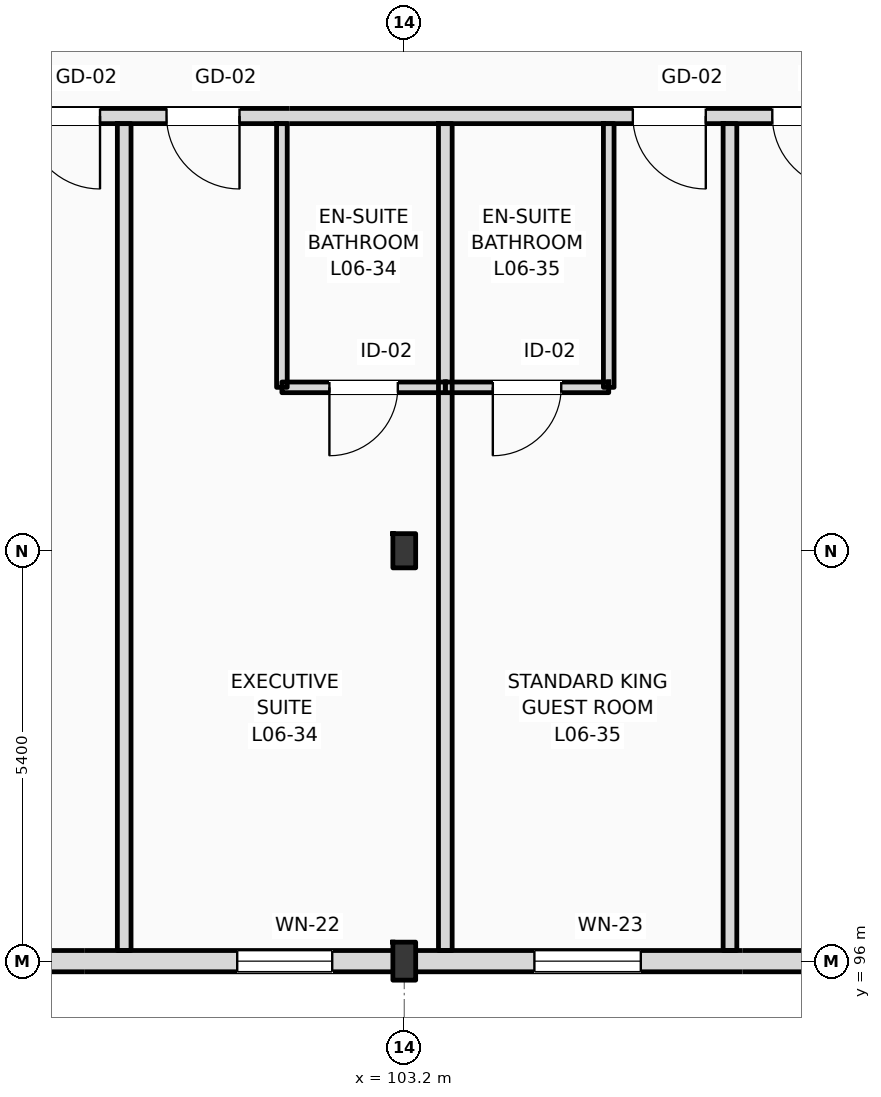
"""IFC4 building model, lengths in metres.
Left out: names, types, materials, properties, quantities, classifications, styles, units other than length and angle.
Written with IfcOpenShell. Run it as: python <this file> out.ifc"""

import sys

from ifc_helpers import new_model, si_unit, direction, frame, frame_2d, origin, origin_2d, place, context, subcontext, project, spatial, rectangle, i_section, extrude, element, fill, save


model = new_model("IFC4")
c1 = context("Model", 3, precision=1e-05, world=origin(), true_north=direction((0.0, 1.0)))
c2 = subcontext(c1, "Body", "Model", "MODEL_VIEW")
j1 = project(units=[si_unit("LENGTHUNIT", "METRE"), si_unit("PLANEANGLEUNIT", "RADIAN")], contexts=[c1])
p1 = place(None, origin())
s1 = spatial("IfcSite", under=j1, at=p1, CompositionType="ELEMENT")
p2 = place(p1, origin())
s2 = spatial("IfcBuilding", under=s1, at=p2, CompositionType="ELEMENT")
p3 = place(p2, frame((0.0, 0.0, 28.2)))
s3 = spatial("IfcBuildingStorey", under=s2, at=p3, CompositionType="ELEMENT", Elevation=28.2)
p4 = place(p3, frame((103.2, 96.0, 0.0), z_axis=(0.0, 0.0, 1.0), x_axis=(1.0, 0.0, 0.0)))
e1 = element("IfcColumn", 1, at=p4, inside=s3, PredefinedType="COLUMN", context=c2, shape_type="SweptSolid", body=[
    extrude(i_section(OverallWidth=0.3, OverallDepth=0.5, WebThickness=0.014, FlangeThickness=0.028, FilletRadius=0.027, at=origin_2d()), origin(), (0.0, 0.0, 1.0), 3.6),
])
p5 = place(p3, frame((103.2, 101.4, 0.0), z_axis=(0.0, 0.0, 1.0), x_axis=(1.0, 0.0, 0.0)))
e2 = element("IfcColumn", 2, at=p5, inside=s3, PredefinedType="COLUMN", context=c2, shape_type="SweptSolid", body=[
    extrude(i_section(OverallWidth=0.3, OverallDepth=0.45, WebThickness=0.014, FlangeThickness=0.026, FilletRadius=0.027, at=origin_2d()), origin(), (0.0, 0.0, 1.0), 3.6),
])
p6 = place(p3, frame((25.2, 96.0, 0.0), z_axis=(0.0, 0.0, 1.0), x_axis=(1.0, 0.0, 0.0)))
e3 = element("IfcWall", 3, at=p6, inside=s3, PredefinedType="STANDARD", context=c2, shape_type="SweptSolid", body=[
    extrude(rectangle(XDim=94.8, YDim=0.28, at=frame_2d((47.4, 0.0))), origin(), (0.0, 0.0, 1.0), 2.8),
])
p7 = place(p6, frame((16.454, 0.0, 0.9)))
e4 = element("IfcOpeningElement", 4, at=p7, cuts=e3, PredefinedType="OPENING", context=c2, shape_type="SweptSolid", body=[
    extrude(rectangle(XDim=2.7, YDim=1.72, at=frame_2d((1.35, 0.86))), frame((0.0, 0.15, 0.0), z_axis=(0.0, -1.0, 0.0), x_axis=(1.0, 0.0, 0.0)), (0.0, 0.0, 1.0), 0.3),
])
p8 = place(p6, frame((20.068, 0.0, 0.9)))
e5 = element("IfcOpeningElement", 5, at=p8, cuts=e3, PredefinedType="OPENING", context=c2, shape_type="SweptSolid", body=[
    extrude(rectangle(XDim=2.389, YDim=1.72, at=frame_2d((1.194, 0.86))), frame((0.0, 0.15, 0.0), z_axis=(0.0, -1.0, 0.0), x_axis=(1.0, 0.0, 0.0)), (0.0, 0.0, 1.0), 0.3),
])
p9 = place(p6, frame((24.277, 0.0, 0.9)))
e6 = element("IfcOpeningElement", 6, at=p9, cuts=e3, PredefinedType="OPENING", context=c2, shape_type="SweptSolid", body=[
    extrude(rectangle(XDim=1.8, YDim=1.72, at=frame_2d((0.9, 0.86))), frame((0.0, 0.15, 0.0), z_axis=(0.0, -1.0, 0.0), x_axis=(1.0, 0.0, 0.0)), (0.0, 0.0, 1.0), 0.3),
])
p10 = place(p6, frame((27.885, 0.0, 0.9)))
e7 = element("IfcOpeningElement", 7, at=p10, cuts=e3, PredefinedType="OPENING", context=c2, shape_type="SweptSolid", body=[
    extrude(rectangle(XDim=2.388, YDim=1.72, at=frame_2d((1.194, 0.86))), frame((0.0, 0.15, 0.0), z_axis=(0.0, -1.0, 0.0), x_axis=(1.0, 0.0, 0.0)), (0.0, 0.0, 1.0), 0.3),
])
p11 = place(p6, frame((32.093, 0.0, 0.9)))
e8 = element("IfcOpeningElement", 8, at=p11, cuts=e3, PredefinedType="OPENING", context=c2, shape_type="SweptSolid", body=[
    extrude(rectangle(XDim=1.8, YDim=1.72, at=frame_2d((0.9, 0.86))), frame((0.0, 0.15, 0.0), z_axis=(0.0, -1.0, 0.0), x_axis=(1.0, 0.0, 0.0)), (0.0, 0.0, 1.0), 0.3),
])
p12 = place(p6, frame((35.702, 0.0, 0.9)))
e9 = element("IfcOpeningElement", 9, at=p12, cuts=e3, PredefinedType="OPENING", context=c2, shape_type="SweptSolid", body=[
    extrude(rectangle(XDim=2.488, YDim=1.72, at=frame_2d((1.244, 0.86))), frame((0.0, 0.15, 0.0), z_axis=(0.0, -1.0, 0.0), x_axis=(1.0, 0.0, 0.0)), (0.0, 0.0, 1.0), 0.3),
])
p13 = place(p6, frame((55.56, 0.0, 0.9)))
e10 = element("IfcOpeningElement", 10, at=p13, cuts=e3, PredefinedType="OPENING", context=c2, shape_type="SweptSolid", body=[
    extrude(rectangle(XDim=1.8, YDim=1.72, at=frame_2d((0.9, 0.86))), frame((0.0, 0.15, 0.0), z_axis=(0.0, -1.0, 0.0), x_axis=(1.0, 0.0, 0.0)), (0.0, 0.0, 1.0), 0.3),
])
p14 = place(p6, frame((58.985, 0.0, 0.9)))
e11 = element("IfcOpeningElement", 11, at=p14, cuts=e3, PredefinedType="OPENING", context=c2, shape_type="SweptSolid", body=[
    extrude(rectangle(XDim=1.8, YDim=1.72, at=frame_2d((0.9, 0.86))), frame((0.0, 0.15, 0.0), z_axis=(0.0, -1.0, 0.0), x_axis=(1.0, 0.0, 0.0)), (0.0, 0.0, 1.0), 0.3),
])
p15 = place(p6, frame((63.21, 0.0, 0.9)))
e12 = element("IfcOpeningElement", 12, at=p15, cuts=e3, PredefinedType="OPENING", context=c2, shape_type="SweptSolid", body=[
    extrude(rectangle(XDim=2.525, YDim=1.72, at=frame_2d((1.262, 0.86))), frame((0.0, 0.15, 0.0), z_axis=(0.0, -1.0, 0.0), x_axis=(1.0, 0.0, 0.0)), (0.0, 0.0, 1.0), 0.3),
])
p16 = place(p6, frame((66.955, 0.0, 0.9)))
e13 = element("IfcOpeningElement", 13, at=p16, cuts=e3, PredefinedType="OPENING", context=c2, shape_type="SweptSolid", body=[
    extrude(rectangle(XDim=1.8, YDim=1.72, at=frame_2d((0.9, 0.86))), frame((0.0, 0.15, 0.0), z_axis=(0.0, -1.0, 0.0), x_axis=(1.0, 0.0, 0.0)), (0.0, 0.0, 1.0), 0.3),
])
p17 = place(p6, frame((71.892, 0.0, 0.9)))
e14 = element("IfcOpeningElement", 14, at=p17, cuts=e3, PredefinedType="OPENING", context=c2, shape_type="SweptSolid", body=[
    extrude(rectangle(XDim=1.1, YDim=1.5, at=frame_2d((0.55, 0.75))), frame((0.0, 0.15, 0.0), z_axis=(0.0, -1.0, 0.0), x_axis=(1.0, 0.0, 0.0)), (0.0, 0.0, 1.0), 0.3),
])
p18 = place(p6, frame((75.802, 0.0, 0.9)))
e15 = element("IfcOpeningElement", 15, at=p18, cuts=e3, PredefinedType="OPENING", context=c2, shape_type="SweptSolid", body=[
    extrude(rectangle(XDim=1.25, YDim=1.6, at=frame_2d((0.625, 0.8))), frame((0.0, 0.15, 0.0), z_axis=(0.0, -1.0, 0.0), x_axis=(1.0, 0.0, 0.0)), (0.0, 0.0, 1.0), 0.3),
])
p19 = place(p6, frame((79.712, 0.0, 0.9)))
e16 = element("IfcOpeningElement", 16, at=p19, cuts=e3, PredefinedType="OPENING", context=c2, shape_type="SweptSolid", body=[
    extrude(rectangle(XDim=1.4, YDim=1.7, at=frame_2d((0.7, 0.85))), frame((0.0, 0.15, 0.0), z_axis=(0.0, -1.0, 0.0), x_axis=(1.0, 0.0, 0.0)), (0.0, 0.0, 1.0), 0.3),
])
p20 = place(p6, frame((83.597, 0.0, 0.9)))
e17 = element("IfcOpeningElement", 17, at=p20, cuts=e3, PredefinedType="OPENING", context=c2, shape_type="SweptSolid", body=[
    extrude(rectangle(XDim=1.6, YDim=1.72, at=frame_2d((0.8, 0.86))), frame((0.0, 0.15, 0.0), z_axis=(0.0, -1.0, 0.0), x_axis=(1.0, 0.0, 0.0)), (0.0, 0.0, 1.0), 0.3),
])
p21 = place(p6, frame((87.507, 0.0, 0.9)))
e18 = element("IfcOpeningElement", 18, at=p21, cuts=e3, PredefinedType="OPENING", context=c2, shape_type="SweptSolid", body=[
    extrude(rectangle(XDim=1.75, YDim=1.72, at=frame_2d((0.875, 0.86))), frame((0.0, 0.15, 0.0), z_axis=(0.0, -1.0, 0.0), x_axis=(1.0, 0.0, 0.0)), (0.0, 0.0, 1.0), 0.3),
])
p22 = place(p6, frame((91.328, 0.0, 0.9)))
e19 = element("IfcOpeningElement", 19, at=p22, cuts=e3, PredefinedType="OPENING", context=c2, shape_type="SweptSolid", body=[
    extrude(rectangle(XDim=2.0, YDim=1.72, at=frame_2d((1.0, 0.86))), frame((0.0, 0.15, 0.0), z_axis=(0.0, -1.0, 0.0), x_axis=(1.0, 0.0, 0.0)), (0.0, 0.0, 1.0), 0.3),
])
p23 = place(p3, frame((79.76, 107.12, 0.0), z_axis=(0.0, 0.0, 1.0), x_axis=(1.0, 0.0, 0.0)))
e20 = element("IfcWall", 20, at=p23, inside=s3, PredefinedType="PARTITIONING", context=c2, shape_type="SweptSolid", body=[
    extrude(rectangle(XDim=40.1, YDim=0.2, at=frame_2d((20.05, 0.0))), origin(), (0.0, 0.0, 1.0), 3.36),
])
p24 = place(p23, frame((2.497, 0.0, 0.0)))
e21 = element("IfcOpeningElement", 21, at=p24, cuts=e20, PredefinedType="OPENING", context=c2, shape_type="SweptSolid", body=[
    extrude(rectangle(XDim=0.96, YDim=2.2, at=frame_2d((0.48, 1.1))), frame((0.0, 0.11, 0.0), z_axis=(0.0, -1.0, 0.0), x_axis=(1.0, 0.0, 0.0)), (0.0, 0.0, 1.0), 0.22),
])
p25 = place(p23, frame((4.372, 0.0, 0.0)))
e22 = element("IfcOpeningElement", 22, at=p25, cuts=e20, PredefinedType="OPENING", context=c2, shape_type="SweptSolid", body=[
    extrude(rectangle(XDim=0.96, YDim=2.2, at=frame_2d((0.48, 1.1))), frame((0.0, 0.11, 0.0), z_axis=(0.0, -1.0, 0.0), x_axis=(1.0, 0.0, 0.0)), (0.0, 0.0, 1.0), 0.22),
])
p26 = place(p23, frame((10.507, 0.0, 0.0)))
e23 = element("IfcOpeningElement", 23, at=p26, cuts=e20, PredefinedType="OPENING", context=c2, shape_type="SweptSolid", body=[
    extrude(rectangle(XDim=0.96, YDim=2.2, at=frame_2d((0.48, 1.1))), frame((0.0, 0.11, 0.0), z_axis=(0.0, -1.0, 0.0), x_axis=(1.0, 0.0, 0.0)), (0.0, 0.0, 1.0), 0.22),
])
p27 = place(p23, frame((12.342, 0.0, 0.0)))
e24 = element("IfcOpeningElement", 24, at=p27, cuts=e20, PredefinedType="OPENING", context=c2, shape_type="SweptSolid", body=[
    extrude(rectangle(XDim=0.96, YDim=2.2, at=frame_2d((0.48, 1.1))), frame((0.0, 0.11, 0.0), z_axis=(0.0, -1.0, 0.0), x_axis=(1.0, 0.0, 0.0)), (0.0, 0.0, 1.0), 0.22),
])
p28 = place(p23, frame((18.477, 0.0, 0.0)))
e25 = element("IfcOpeningElement", 25, at=p28, cuts=e20, PredefinedType="OPENING", context=c2, shape_type="SweptSolid", body=[
    extrude(rectangle(XDim=0.96, YDim=2.2, at=frame_2d((0.48, 1.1))), frame((0.0, 0.11, 0.0), z_axis=(0.0, -1.0, 0.0), x_axis=(1.0, 0.0, 0.0)), (0.0, 0.0, 1.0), 0.22),
])
p29 = place(p23, frame((20.312, 0.0, 0.0)))
e26 = element("IfcOpeningElement", 26, at=p29, cuts=e20, PredefinedType="OPENING", context=c2, shape_type="SweptSolid", body=[
    extrude(rectangle(XDim=0.96, YDim=2.2, at=frame_2d((0.48, 1.1))), frame((0.0, 0.11, 0.0), z_axis=(0.0, -1.0, 0.0), x_axis=(1.0, 0.0, 0.0)), (0.0, 0.0, 1.0), 0.22),
])
p30 = place(p23, frame((26.447, 0.0, 0.0)))
e27 = element("IfcOpeningElement", 27, at=p30, cuts=e20, PredefinedType="OPENING", context=c2, shape_type="SweptSolid", body=[
    extrude(rectangle(XDim=0.96, YDim=2.2, at=frame_2d((0.48, 1.1))), frame((0.0, 0.11, 0.0), z_axis=(0.0, -1.0, 0.0), x_axis=(1.0, 0.0, 0.0)), (0.0, 0.0, 1.0), 0.22),
])
p31 = place(p23, frame((28.282, 0.0, 0.0)))
e28 = element("IfcOpeningElement", 28, at=p31, cuts=e20, PredefinedType="OPENING", context=c2, shape_type="SweptSolid", body=[
    extrude(rectangle(XDim=0.96, YDim=2.2, at=frame_2d((0.48, 1.1))), frame((0.0, 0.11, 0.0), z_axis=(0.0, -1.0, 0.0), x_axis=(1.0, 0.0, 0.0)), (0.0, 0.0, 1.0), 0.22),
])
p32 = place(p23, frame((34.417, 0.0, 0.0)))
e29 = element("IfcOpeningElement", 29, at=p32, cuts=e20, PredefinedType="OPENING", context=c2, shape_type="SweptSolid", body=[
    extrude(rectangle(XDim=0.96, YDim=2.2, at=frame_2d((0.48, 1.1))), frame((0.0, 0.11, 0.0), z_axis=(0.0, -1.0, 0.0), x_axis=(1.0, 0.0, 0.0)), (0.0, 0.0, 1.0), 0.22),
])
p33 = place(p23, frame((36.212, 0.0, 0.0)))
e30 = element("IfcOpeningElement", 30, at=p33, cuts=e20, PredefinedType="OPENING", context=c2, shape_type="SweptSolid", body=[
    extrude(rectangle(XDim=0.96, YDim=2.2, at=frame_2d((0.48, 1.1))), frame((0.0, 0.11, 0.0), z_axis=(0.0, -1.0, 0.0), x_axis=(1.0, 0.0, 0.0)), (0.0, 0.0, 1.0), 0.22),
])
for number, where, z_axis, x_axis in (
    (31, (99.515, 96.14, 0.0), (0.0, 0.0, 1.0), (0.0, 1.0, 0.0)),
    (32, (103.74, 96.14, 0.0), (0.0, 0.0, 1.0), (0.0, 1.0, 0.0)),
):
    element("IfcWall", number, at=place(p3, frame(where, z_axis=z_axis, x_axis=x_axis)), inside=s3, PredefinedType="PARTITIONING", context=c2, shape_type="SweptSolid", body=[
        extrude(rectangle(XDim=10.88, YDim=0.18, at=frame_2d((5.44, 0.0))), origin(), (0.0, 0.0, 1.0), 3.36),
    ])
p34 = place(p3, frame((101.59, 103.55, 0.0), z_axis=(0.0, 0.0, 1.0), x_axis=(0.0, 1.0, 0.0)))
e33 = element("IfcWall", 33, at=p34, inside=s3, PredefinedType="PARTITIONING", context=c2, shape_type="SweptSolid", body=[
    extrude(rectangle(XDim=3.47, YDim=0.14, at=frame_2d((1.735, 0.0))), origin(), (0.0, 0.0, 1.0), 3.36),
])
p35 = place(p3, frame((101.59, 103.55, 0.0), z_axis=(0.0, 0.0, 1.0), x_axis=(1.0, 0.0, 0.0)))
e34 = element("IfcWall", 34, at=p35, inside=s3, PredefinedType="PARTITIONING", context=c2, shape_type="SweptSolid", body=[
    extrude(rectangle(XDim=2.15, YDim=0.14, at=frame_2d((1.075, 0.0))), origin(), (0.0, 0.0, 1.0), 3.36),
])
p36 = place(p35, frame((0.625, 0.0, 0.0)))
e35 = element("IfcOpeningElement", 35, at=p36, cuts=e34, PredefinedType="OPENING", context=c2, shape_type="SweptSolid", body=[
    extrude(rectangle(XDim=0.9, YDim=2.1, at=frame_2d((0.45, 1.05))), frame((0.0, 0.08, 0.0), z_axis=(0.0, -1.0, 0.0), x_axis=(1.0, 0.0, 0.0)), (0.0, 0.0, 1.0), 0.16),
])
p37 = place(p3, frame((107.485, 96.14, 0.0), z_axis=(0.0, 0.0, 1.0), x_axis=(0.0, 1.0, 0.0)))
e36 = element("IfcWall", 36, at=p37, inside=s3, PredefinedType="PARTITIONING", context=c2, shape_type="SweptSolid", body=[
    extrude(rectangle(XDim=10.88, YDim=0.18, at=frame_2d((5.44, 0.0))), origin(), (0.0, 0.0, 1.0), 3.36),
])
p38 = place(p3, frame((105.89, 103.55, 0.0), z_axis=(0.0, 0.0, 1.0), x_axis=(0.0, 1.0, 0.0)))
e37 = element("IfcWall", 37, at=p38, inside=s3, PredefinedType="PARTITIONING", context=c2, shape_type="SweptSolid", body=[
    extrude(rectangle(XDim=3.47, YDim=0.14, at=frame_2d((1.735, 0.0))), origin(), (0.0, 0.0, 1.0), 3.05),
])
p39 = place(p3, frame((103.74, 103.55, 0.0), z_axis=(0.0, 0.0, 1.0), x_axis=(1.0, 0.0, 0.0)))
e38 = element("IfcWall", 38, at=p39, inside=s3, PredefinedType="PARTITIONING", context=c2, shape_type="SweptSolid", body=[
    extrude(rectangle(XDim=2.15, YDim=0.14, at=frame_2d((1.075, 0.0))), origin(), (0.0, 0.0, 1.0), 3.36),
])
p40 = place(p39, frame((0.625, 0.0, 0.0)))
e39 = element("IfcOpeningElement", 39, at=p40, cuts=e38, PredefinedType="OPENING", context=c2, shape_type="SweptSolid", body=[
    extrude(rectangle(XDim=0.9, YDim=2.1, at=frame_2d((0.45, 1.05))), frame((0.0, 0.08, 0.0), z_axis=(0.0, -1.0, 0.0), x_axis=(1.0, 0.0, 0.0)), (0.0, 0.0, 1.0), 0.16),
])
p41 = place(p18, origin())
e40 = element("IfcWindow", 40, at=p41, inside=s3, PartitioningType="DOUBLE_PANEL_VERTICAL", PredefinedType="WINDOW", context=c2, shape_type="SweptSolid", body=[
    extrude(rectangle(XDim=1.25, YDim=1.6, at=frame_2d((0.625, 0.8))), frame((0.0, 0.03, 0.0), z_axis=(0.0, -1.0, 0.0), x_axis=(1.0, 0.0, 0.0)), (0.0, 0.0, 1.0), 0.06),
])
fill(e15, e40)
p42 = place(p19, origin())
e41 = element("IfcWindow", 41, at=p42, inside=s3, PartitioningType="DOUBLE_PANEL_VERTICAL", PredefinedType="WINDOW", context=c2, shape_type="SweptSolid", body=[
    extrude(rectangle(XDim=1.4, YDim=1.7, at=frame_2d((0.7, 0.85))), frame((0.0, 0.03, 0.0), z_axis=(0.0, -1.0, 0.0), x_axis=(1.0, 0.0, 0.0)), (0.0, 0.0, 1.0), 0.06),
])
fill(e16, e41)
p43 = place(p28, frame((0.96, 0.0, 0.0), z_axis=(0.0, 0.0, 1.0), x_axis=(-1.0, 0.0, 0.0)))
e42 = element("IfcDoor", 42, at=p43, inside=s3, OperationType="SINGLE_SWING_RIGHT", PredefinedType="DOOR", context=c2, shape_type="SweptSolid", body=[
    extrude(rectangle(XDim=0.96, YDim=2.2, at=frame_2d((0.48, 1.1))), frame((0.0, 0.025, 0.0), z_axis=(0.0, -1.0, 0.0), x_axis=(1.0, 0.0, 0.0)), (0.0, 0.0, 1.0), 0.05),
])
fill(e25, e42)
p44 = place(p29, frame((0.96, 0.0, 0.0), z_axis=(0.0, 0.0, 1.0), x_axis=(-1.0, 0.0, 0.0)))
e43 = element("IfcDoor", 43, at=p44, inside=s3, OperationType="SINGLE_SWING_RIGHT", PredefinedType="DOOR", context=c2, shape_type="SweptSolid", body=[
    extrude(rectangle(XDim=0.96, YDim=2.2, at=frame_2d((0.48, 1.1))), frame((0.0, 0.025, 0.0), z_axis=(0.0, -1.0, 0.0), x_axis=(1.0, 0.0, 0.0)), (0.0, 0.0, 1.0), 0.05),
])
fill(e26, e43)
p45 = place(p36, frame((0.9, 0.0, 0.0), z_axis=(0.0, 0.0, 1.0), x_axis=(-1.0, 0.0, 0.0)))
e44 = element("IfcDoor", 44, at=p45, inside=s3, OperationType="SINGLE_SWING_LEFT", PredefinedType="DOOR", context=c2, shape_type="SweptSolid", body=[
    extrude(rectangle(XDim=0.9, YDim=2.1, at=frame_2d((0.45, 1.05))), frame((0.0, 0.025, 0.0), z_axis=(0.0, -1.0, 0.0), x_axis=(1.0, 0.0, 0.0)), (0.0, 0.0, 1.0), 0.05),
])
fill(e35, e44)
p46 = place(p30, frame((0.96, 0.0, 0.0), z_axis=(0.0, 0.0, 1.0), x_axis=(-1.0, 0.0, 0.0)))
e45 = element("IfcDoor", 45, at=p46, inside=s3, OperationType="SINGLE_SWING_RIGHT", PredefinedType="DOOR", context=c2, shape_type="SweptSolid", body=[
    extrude(rectangle(XDim=0.96, YDim=2.2, at=frame_2d((0.48, 1.1))), frame((0.0, 0.025, 0.0), z_axis=(0.0, -1.0, 0.0), x_axis=(1.0, 0.0, 0.0)), (0.0, 0.0, 1.0), 0.05),
])
fill(e27, e45)
p47 = place(p40, frame((0.9, 0.0, 0.0), z_axis=(0.0, 0.0, 1.0), x_axis=(-1.0, 0.0, 0.0)))
e46 = element("IfcDoor", 46, at=p47, inside=s3, OperationType="SINGLE_SWING_LEFT", PredefinedType="DOOR", context=c2, shape_type="SweptSolid", body=[
    extrude(rectangle(XDim=0.9, YDim=2.1, at=frame_2d((0.45, 1.05))), frame((0.0, 0.025, 0.0), z_axis=(0.0, -1.0, 0.0), x_axis=(1.0, 0.0, 0.0)), (0.0, 0.0, 1.0), 0.05),
])
fill(e39, e46)
p48 = place(p31, frame((0.96, 0.0, 0.0), z_axis=(0.0, 0.0, 1.0), x_axis=(-1.0, 0.0, 0.0)))
e47 = element("IfcDoor", 47, at=p48, inside=s3, OperationType="SINGLE_SWING_RIGHT", PredefinedType="DOOR", context=c2, shape_type="SweptSolid", body=[
    extrude(rectangle(XDim=0.96, YDim=2.2, at=frame_2d((0.48, 1.1))), frame((0.0, 0.025, 0.0), z_axis=(0.0, -1.0, 0.0), x_axis=(1.0, 0.0, 0.0)), (0.0, 0.0, 1.0), 0.05),
])
fill(e28, e47)
save(model, sys.argv[1])
